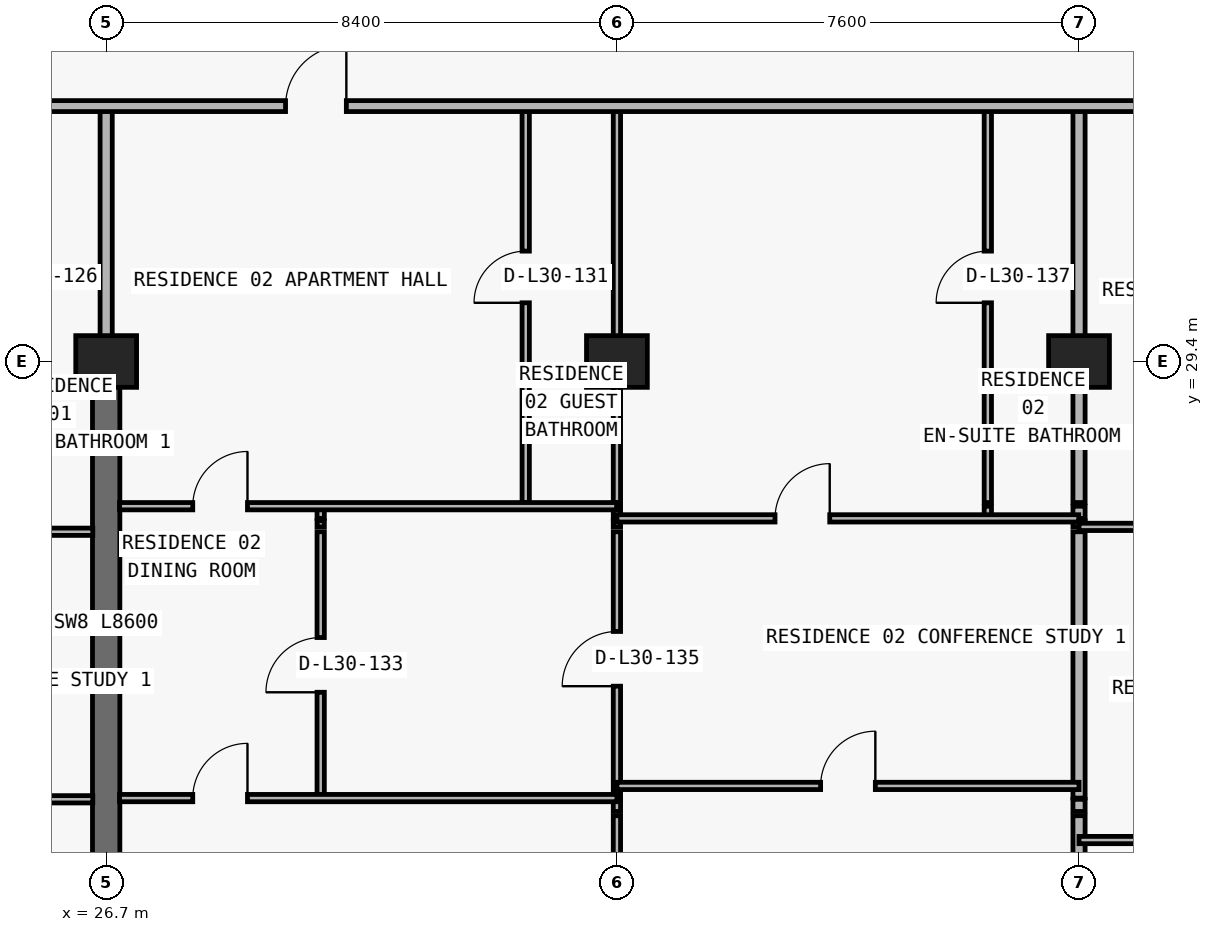
"""IFC4 building model, lengths in metres.
Left out: names, types, materials, properties, quantities, classifications, styles, units other than length and angle.
Written with IfcOpenShell. Run it as: python <this file> out.ifc"""

import sys

from ifc_helpers import new_model, si_unit, direction, frame, frame_2d, origin, origin_2d, place, context, subcontext, project, spatial, rectangle, extrude, element, fill, save


model = new_model("IFC4")
c1 = context("Model", 3, precision=1e-05, world=origin(), true_north=direction((0.0, 1.0)))
c2 = subcontext(c1, "Body", "Model", "MODEL_VIEW")
j1 = project(units=[si_unit("LENGTHUNIT", "METRE"), si_unit("PLANEANGLEUNIT", "RADIAN")], contexts=[c1])
p1 = place(None, origin())
s1 = spatial("IfcSite", under=j1, at=p1, CompositionType="ELEMENT")
p2 = place(p1, origin())
s2 = spatial("IfcBuilding", under=s1, at=p2, CompositionType="ELEMENT")
p3 = place(p2, frame((0.0, 0.0, 112.5)))
s3 = spatial("IfcBuildingStorey", under=s2, at=p3, CompositionType="ELEMENT", Elevation=112.5)
for number, where, z_axis, x_axis in (
    (1, (26.7, 29.4, 0.0), (0.0, 0.0, 1.0), (1.0, 0.0, 0.0)),
    (2, (35.1, 29.4, 0.0), (0.0, 0.0, 1.0), (1.0, 0.0, 0.0)),
    (3, (42.7, 29.4, 0.0), (0.0, 0.0, 1.0), (1.0, 0.0, 0.0)),
):
    element("IfcColumn", number, at=place(p3, frame(where, z_axis=z_axis, x_axis=x_axis)), inside=s3, PredefinedType="COLUMN", context=c2, shape_type="SweptSolid", body=[
        extrude(rectangle(XDim=1.0, YDim=0.85, at=origin_2d()), origin(), (0.0, 0.0, 1.0), 3.05),
    ])
p4 = place(p3, frame((26.7, 20.8, 0.0), z_axis=(0.0, 0.0, 1.0), x_axis=(0.0, 1.0, 0.0)))
e4 = element("IfcWall", 4, at=p4, inside=s3, PredefinedType="SHEAR", context=c2, shape_type="SweptSolid", body=[
    extrude(rectangle(XDim=8.6, YDim=0.45, at=frame_2d((4.3, 0.0))), origin(), (0.0, 0.0, 1.0), 3.05),
])
p5 = place(p3, frame((26.7, 29.405, 0.0), z_axis=(0.0, 0.0, 1.0), x_axis=(0.0, 1.0, 0.0)))
e5 = element("IfcWall", 5, at=p5, inside=s3, PredefinedType="PARTITIONING", context=c2, shape_type="SweptSolid", body=[
    extrude(rectangle(XDim=4.195, YDim=0.2, at=frame_2d((2.098, 0.0))), origin(), (0.0, 0.0, 1.0), 2.335),
])
p6 = place(p3, frame((30.228, 22.22, 0.0), z_axis=(0.0, 0.0, 1.0), x_axis=(0.0, 1.0, 0.0)))
e6 = element("IfcWall", 6, at=p6, inside=s3, PredefinedType="PARTITIONING", context=c2, shape_type="SweptSolid", body=[
    extrude(rectangle(XDim=4.38, YDim=0.12, at=frame_2d((2.19, 0.0))), origin(), (0.0, 0.0, 1.0), 3.05),
])
p7 = place(p6, frame((1.74, 0.0, 0.0)))
e7 = element("IfcOpeningElement", 7, at=p7, cuts=e6, PredefinedType="OPENING", context=c2, shape_type="SweptSolid", body=[
    extrude(rectangle(XDim=0.9, YDim=2.15, at=frame_2d((0.45, 1.075))), frame((0.0, 0.07, 0.0), z_axis=(0.0, -1.0, 0.0), x_axis=(1.0, 0.0, 0.0)), (0.0, 0.0, 1.0), 0.14),
])
p8 = place(p3, frame((30.228, 26.68, 0.0), z_axis=(0.0, 0.0, 1.0), x_axis=(0.0, 1.0, 0.0)))
e8 = element("IfcWall", 8, at=p8, inside=s3, PredefinedType="PARTITIONING", context=c2, shape_type="SweptSolid", body=[
    extrude(rectangle(XDim=0.1, YDim=0.12, at=frame_2d((0.05, 0.0))), origin(), (0.0, 0.0, 1.0), 3.05),
])
p9 = place(p3, frame((30.228, 26.82, 0.0), z_axis=(0.0, 0.0, 1.0), x_axis=(0.0, 1.0, 0.0)))
e9 = element("IfcWall", 9, at=p9, inside=s3, PredefinedType="PARTITIONING", context=c2, shape_type="SweptSolid", body=[
    extrude(rectangle(XDim=0.2, YDim=0.12, at=frame_2d((0.1, 0.0))), origin(), (0.0, 0.0, 1.0), 3.05),
])
p10 = place(p3, frame((33.6, 27.08, 0.0), z_axis=(0.0, 0.0, 1.0), x_axis=(0.0, 1.0, 0.0)))
e10 = element("IfcWall", 10, at=p10, inside=s3, PredefinedType="PARTITIONING", context=c2, shape_type="SweptSolid", body=[
    extrude(rectangle(XDim=6.52, YDim=0.12, at=frame_2d((3.26, 0.0))), origin(), (0.0, 0.0, 1.0), 3.05),
])
p11 = place(p10, frame((3.285, 0.0, 0.0)))
e11 = element("IfcOpeningElement", 11, at=p11, cuts=e10, PredefinedType="OPENING", context=c2, shape_type="SweptSolid", body=[
    extrude(rectangle(XDim=0.85, YDim=2.1, at=frame_2d((0.425, 1.05))), frame((0.0, 0.07, 0.0), z_axis=(0.0, -1.0, 0.0), x_axis=(1.0, 0.0, 0.0)), (0.0, 0.0, 1.0), 0.14),
])
p12 = place(p3, frame((35.1, 8.84, 0.0), z_axis=(0.0, 0.0, 1.0), x_axis=(0.0, 1.0, 0.0)))
e12 = element("IfcWall", 12, at=p12, inside=s3, PredefinedType="PARTITIONING", context=c2, shape_type="SweptSolid", body=[
    extrude(rectangle(XDim=13.09, YDim=0.12, at=frame_2d((6.545, 0.0))), origin(), (0.0, 0.0, 1.0), 2.174),
])
p13 = place(p3, frame((35.1, 22.0, 0.0), z_axis=(0.0, 0.0, 1.0), x_axis=(0.0, 1.0, 0.0)))
e13 = element("IfcWall", 13, at=p13, inside=s3, PredefinedType="PARTITIONING", context=c2, shape_type="SweptSolid", body=[
    extrude(rectangle(XDim=0.2, YDim=0.12, at=frame_2d((0.1, 0.0))), origin(), (0.0, 0.0, 1.0), 2.174),
])
p14 = place(p3, frame((35.1, 22.22, 0.0), z_axis=(0.0, 0.0, 1.0), x_axis=(0.0, 1.0, 0.0)))
e14 = element("IfcWall", 14, at=p14, inside=s3, PredefinedType="PARTITIONING", context=c2, shape_type="SweptSolid", body=[
    extrude(rectangle(XDim=4.38, YDim=0.12, at=frame_2d((2.19, 0.0))), origin(), (0.0, 0.0, 1.0), 2.174),
])
p15 = place(p14, frame((1.84, 0.0, 0.0)))
e15 = element("IfcOpeningElement", 15, at=p15, cuts=e14, PredefinedType="OPENING", context=c2, shape_type="SweptSolid", body=[
    extrude(rectangle(XDim=0.9, YDim=2.124, at=frame_2d((0.45, 1.062))), frame((0.0, 0.07, 0.0), z_axis=(0.0, -1.0, 0.0), x_axis=(1.0, 0.0, 0.0)), (0.0, 0.0, 1.0), 0.14),
])
p16 = place(p3, frame((35.1, 26.68, 0.0), z_axis=(0.0, 0.0, 1.0), x_axis=(0.0, 1.0, 0.0)))
e16 = element("IfcWall", 16, at=p16, inside=s3, PredefinedType="PARTITIONING", context=c2, shape_type="SweptSolid", body=[
    extrude(rectangle(XDim=0.1, YDim=0.12, at=frame_2d((0.05, 0.0))), origin(), (0.0, 0.0, 1.0), 2.174),
])
p17 = place(p3, frame((35.1, 26.82, 0.0), z_axis=(0.0, 0.0, 1.0), x_axis=(0.0, 1.0, 0.0)))
e17 = element("IfcWall", 17, at=p17, inside=s3, PredefinedType="PARTITIONING", context=c2, shape_type="SweptSolid", body=[
    extrude(rectangle(XDim=0.2, YDim=0.12, at=frame_2d((0.1, 0.0))), origin(), (0.0, 0.0, 1.0), 2.174),
])
p18 = place(p3, frame((35.1, 27.08, 0.0), z_axis=(0.0, 0.0, 1.0), x_axis=(0.0, 1.0, 0.0)))
e18 = element("IfcWall", 18, at=p18, inside=s3, PredefinedType="PARTITIONING", context=c2, shape_type="SweptSolid", body=[
    extrude(rectangle(XDim=6.52, YDim=0.12, at=frame_2d((3.26, 0.0))), origin(), (0.0, 0.0, 1.0), 2.174),
])
p19 = place(p3, frame((41.2, 26.82, 0.0), z_axis=(0.0, 0.0, 1.0), x_axis=(0.0, 1.0, 0.0)))
e19 = element("IfcWall", 19, at=p19, inside=s3, PredefinedType="PARTITIONING", context=c2, shape_type="SweptSolid", body=[
    extrude(rectangle(XDim=0.2, YDim=0.12, at=frame_2d((0.1, 0.0))), origin(), (0.0, 0.0, 1.0), 3.05),
])
p20 = place(p3, frame((41.2, 27.08, 0.0), z_axis=(0.0, 0.0, 1.0), x_axis=(0.0, 1.0, 0.0)))
e20 = element("IfcWall", 20, at=p20, inside=s3, PredefinedType="PARTITIONING", context=c2, shape_type="SweptSolid", body=[
    extrude(rectangle(XDim=6.52, YDim=0.12, at=frame_2d((3.26, 0.0))), origin(), (0.0, 0.0, 1.0), 3.05),
])
p21 = place(p20, frame((3.285, 0.0, 0.0)))
e21 = element("IfcOpeningElement", 21, at=p21, cuts=e20, PredefinedType="OPENING", context=c2, shape_type="SweptSolid", body=[
    extrude(rectangle(XDim=0.85, YDim=2.1, at=frame_2d((0.425, 1.05))), frame((0.0, 0.07, 0.0), z_axis=(0.0, -1.0, 0.0), x_axis=(1.0, 0.0, 0.0)), (0.0, 0.0, 1.0), 0.14),
])
p22 = place(p3, frame((42.7, 8.84, 0.0), z_axis=(0.0, 0.0, 1.0), x_axis=(0.0, 1.0, 0.0)))
e22 = element("IfcWall", 22, at=p22, inside=s3, PredefinedType="PARTITIONING", context=c2, shape_type="SweptSolid", body=[
    extrude(rectangle(XDim=13.09, YDim=0.2, at=frame_2d((6.545, 0.0))), origin(), (0.0, 0.0, 1.0), 2.174),
])
p23 = place(p3, frame((42.7, 22.0, 0.0), z_axis=(0.0, 0.0, 1.0), x_axis=(0.0, 1.0, 0.0)))
e23 = element("IfcWall", 23, at=p23, inside=s3, PredefinedType="PARTITIONING", context=c2, shape_type="SweptSolid", body=[
    extrude(rectangle(XDim=0.2, YDim=0.2, at=frame_2d((0.1, 0.0))), origin(), (0.0, 0.0, 1.0), 2.174),
])
p24 = place(p3, frame((42.7, 22.22, 0.0), z_axis=(0.0, 0.0, 1.0), x_axis=(0.0, 1.0, 0.0)))
e24 = element("IfcWall", 24, at=p24, inside=s3, PredefinedType="PARTITIONING", context=c2, shape_type="SweptSolid", body=[
    extrude(rectangle(XDim=4.38, YDim=0.2, at=frame_2d((2.19, 0.0))), origin(), (0.0, 0.0, 1.0), 2.174),
])
p25 = place(p3, frame((42.7, 26.68, 0.0), z_axis=(0.0, 0.0, 1.0), x_axis=(0.0, 1.0, 0.0)))
e25 = element("IfcWall", 25, at=p25, inside=s3, PredefinedType="PARTITIONING", context=c2, shape_type="SweptSolid", body=[
    extrude(rectangle(XDim=0.1, YDim=0.2, at=frame_2d((0.05, 0.0))), origin(), (0.0, 0.0, 1.0), 2.174),
])
p26 = place(p3, frame((42.7, 26.82, 0.0), z_axis=(0.0, 0.0, 1.0), x_axis=(0.0, 1.0, 0.0)))
e26 = element("IfcWall", 26, at=p26, inside=s3, PredefinedType="PARTITIONING", context=c2, shape_type="SweptSolid", body=[
    extrude(rectangle(XDim=0.2, YDim=0.2, at=frame_2d((0.1, 0.0))), origin(), (0.0, 0.0, 1.0), 2.174),
])
p27 = place(p3, frame((42.7, 27.08, 0.0), z_axis=(0.0, 0.0, 1.0), x_axis=(0.0, 1.0, 0.0)))
e27 = element("IfcWall", 27, at=p27, inside=s3, PredefinedType="PARTITIONING", context=c2, shape_type="SweptSolid", body=[
    extrude(rectangle(XDim=6.52, YDim=0.2, at=frame_2d((3.26, 0.0))), origin(), (0.0, 0.0, 1.0), 2.174),
])
p28 = place(p3, frame((42.7, 21.53, 0.0), z_axis=(0.0, 0.0, 1.0), x_axis=(1.0, 0.0, 0.0)))
e28 = element("IfcWall", 28, at=p28, inside=s3, PredefinedType="PARTITIONING", context=c2, shape_type="SweptSolid", body=[
    extrude(rectangle(XDim=8.18, YDim=0.12, at=frame_2d((4.09, 0.0))), origin(), (0.0, 0.0, 1.0), 3.05),
])
p29 = place(p28, frame((1.524, 0.0, 0.0)))
e29 = element("IfcOpeningElement", 29, at=p29, cuts=e28, PredefinedType="OPENING", context=c2, shape_type="SweptSolid", body=[
    extrude(rectangle(XDim=0.9, YDim=2.15, at=frame_2d((0.45, 1.075))), frame((0.0, 0.07, 0.0), z_axis=(0.0, -1.0, 0.0), x_axis=(1.0, 0.0, 0.0)), (0.0, 0.0, 1.0), 0.14),
])
p30 = place(p28, frame((5.783, 0.0, 0.0)))
e30 = element("IfcOpeningElement", 30, at=p30, cuts=e28, PredefinedType="OPENING", context=c2, shape_type="SweptSolid", body=[
    extrude(rectangle(XDim=0.9, YDim=2.15, at=frame_2d((0.45, 1.075))), frame((0.0, 0.07, 0.0), z_axis=(0.0, -1.0, 0.0), x_axis=(1.0, 0.0, 0.0)), (0.0, 0.0, 1.0), 0.14),
])
p31 = place(p3, frame((18.3, 22.2, 0.0), z_axis=(0.0, 0.0, 1.0), x_axis=(1.0, 0.0, 0.0)))
e31 = element("IfcWall", 31, at=p31, inside=s3, PredefinedType="PARTITIONING", context=c2, shape_type="SweptSolid", body=[
    extrude(rectangle(XDim=8.18, YDim=0.12, at=frame_2d((4.09, 0.0))), origin(), (0.0, 0.0, 1.0), 3.05),
])
p32 = place(p31, frame((3.64, 0.0, 0.0)))
e32 = element("IfcOpeningElement", 32, at=p32, cuts=e31, PredefinedType="OPENING", context=c2, shape_type="SweptSolid", body=[
    extrude(rectangle(XDim=0.9, YDim=2.15, at=frame_2d((0.45, 1.075))), frame((0.0, 0.07, 0.0), z_axis=(0.0, -1.0, 0.0), x_axis=(1.0, 0.0, 0.0)), (0.0, 0.0, 1.0), 0.14),
])
p33 = place(p3, frame((26.92, 22.22, 0.0), z_axis=(0.0, 0.0, 1.0), x_axis=(1.0, 0.0, 0.0)))
e33 = element("IfcWall", 33, at=p33, inside=s3, PredefinedType="PARTITIONING", context=c2, shape_type="SweptSolid", body=[
    extrude(rectangle(XDim=8.18, YDim=0.12, at=frame_2d((4.09, 0.0))), origin(), (0.0, 0.0, 1.0), 3.05),
])
p34 = place(p33, frame((1.204, 0.0, 0.0)))
e34 = element("IfcOpeningElement", 34, at=p34, cuts=e33, PredefinedType="OPENING", context=c2, shape_type="SweptSolid", body=[
    extrude(rectangle(XDim=0.9, YDim=2.15, at=frame_2d((0.45, 1.075))), frame((0.0, 0.07, 0.0), z_axis=(0.0, -1.0, 0.0), x_axis=(1.0, 0.0, 0.0)), (0.0, 0.0, 1.0), 0.14),
])
p35 = place(p3, frame((35.1, 22.42, 0.0), z_axis=(0.0, 0.0, 1.0), x_axis=(1.0, 0.0, 0.0)))
e35 = element("IfcWall", 35, at=p35, inside=s3, PredefinedType="PARTITIONING", context=c2, shape_type="SweptSolid", body=[
    extrude(rectangle(XDim=7.6, YDim=0.12, at=frame_2d((3.8, 0.0))), origin(), (0.0, 0.0, 1.0), 3.05),
])
p36 = place(p35, frame((3.35, 0.0, 0.0)))
e36 = element("IfcOpeningElement", 36, at=p36, cuts=e35, PredefinedType="OPENING", context=c2, shape_type="SweptSolid", body=[
    extrude(rectangle(XDim=0.9, YDim=2.15, at=frame_2d((0.45, 1.075))), frame((0.0, 0.07, 0.0), z_axis=(0.0, -1.0, 0.0), x_axis=(1.0, 0.0, 0.0)), (0.0, 0.0, 1.0), 0.14),
])
p37 = place(p3, frame((18.3, 26.6, 0.0), z_axis=(0.0, 0.0, 1.0), x_axis=(1.0, 0.0, 0.0)))
e37 = element("IfcWall", 37, at=p37, inside=s3, PredefinedType="PARTITIONING", context=c2, shape_type="SweptSolid", body=[
    extrude(rectangle(XDim=8.18, YDim=0.12, at=frame_2d((4.09, 0.0))), origin(), (0.0, 0.0, 1.0), 3.05),
])
p38 = place(p37, frame((3.0, 0.0, 0.0)))
e38 = element("IfcOpeningElement", 38, at=p38, cuts=e37, PredefinedType="OPENING", context=c2, shape_type="SweptSolid", body=[
    extrude(rectangle(XDim=0.9, YDim=2.15, at=frame_2d((0.45, 1.075))), frame((0.0, 0.07, 0.0), z_axis=(0.0, -1.0, 0.0), x_axis=(1.0, 0.0, 0.0)), (0.0, 0.0, 1.0), 0.14),
])
p39 = place(p3, frame((42.7, 26.68, 0.0), z_axis=(0.0, 0.0, 1.0), x_axis=(1.0, 0.0, 0.0)))
e39 = element("IfcWall", 39, at=p39, inside=s3, PredefinedType="PARTITIONING", context=c2, shape_type="SweptSolid", body=[
    extrude(rectangle(XDim=8.18, YDim=0.12, at=frame_2d((4.09, 0.0))), origin(), (0.0, 0.0, 1.0), 3.05),
])
p40 = place(p39, frame((1.693, 0.0, 0.0)))
e40 = element("IfcOpeningElement", 40, at=p40, cuts=e39, PredefinedType="OPENING", context=c2, shape_type="SweptSolid", body=[
    extrude(rectangle(XDim=0.9, YDim=2.15, at=frame_2d((0.45, 1.075))), frame((0.0, 0.07, 0.0), z_axis=(0.0, -1.0, 0.0), x_axis=(1.0, 0.0, 0.0)), (0.0, 0.0, 1.0), 0.14),
])
p41 = place(p3, frame((35.1, 26.82, 0.0), z_axis=(0.0, 0.0, 1.0), x_axis=(1.0, 0.0, 0.0)))
e41 = element("IfcWall", 41, at=p41, inside=s3, PredefinedType="PARTITIONING", context=c2, shape_type="SweptSolid", body=[
    extrude(rectangle(XDim=7.595, YDim=0.12, at=frame_2d((3.797, 0.0))), origin(), (0.0, 0.0, 1.0), 3.05),
])
p42 = place(p41, frame((2.6, 0.0, 0.0)))
e42 = element("IfcOpeningElement", 42, at=p42, cuts=e41, PredefinedType="OPENING", context=c2, shape_type="SweptSolid", body=[
    extrude(rectangle(XDim=0.9, YDim=2.15, at=frame_2d((0.45, 1.075))), frame((0.0, 0.07, 0.0), z_axis=(0.0, -1.0, 0.0), x_axis=(1.0, 0.0, 0.0)), (0.0, 0.0, 1.0), 0.14),
])
p43 = place(p3, frame((26.92, 27.02, 0.0), z_axis=(0.0, 0.0, 1.0), x_axis=(1.0, 0.0, 0.0)))
e43 = element("IfcWall", 43, at=p43, inside=s3, PredefinedType="PARTITIONING", context=c2, shape_type="SweptSolid", body=[
    extrude(rectangle(XDim=8.175, YDim=0.12, at=frame_2d((4.087, 0.0))), origin(), (0.0, 0.0, 1.0), 3.05),
])
p44 = place(p43, frame((1.204, 0.0, 0.0)))
e44 = element("IfcOpeningElement", 44, at=p44, cuts=e43, PredefinedType="OPENING", context=c2, shape_type="SweptSolid", body=[
    extrude(rectangle(XDim=0.9, YDim=2.15, at=frame_2d((0.45, 1.075))), frame((0.0, 0.07, 0.0), z_axis=(0.0, -1.0, 0.0), x_axis=(1.0, 0.0, 0.0)), (0.0, 0.0, 1.0), 0.14),
])
p45 = place(p3, frame((18.3, 33.6, 0.0), z_axis=(0.0, 0.0, 1.0), x_axis=(1.0, 0.0, 0.0)))
e45 = element("IfcWall", 45, at=p45, inside=s3, PredefinedType="PARTITIONING", context=c2, shape_type="SweptSolid", body=[
    extrude(rectangle(XDim=41.2, YDim=0.18, at=frame_2d((20.6, 0.0))), origin(), (0.0, 0.0, 1.0), 3.05),
])
p46 = place(p45, frame((11.35, 0.0, 0.0)))
e46 = element("IfcOpeningElement", 46, at=p46, cuts=e45, PredefinedType="OPENING", context=c2, shape_type="SweptSolid", body=[
    extrude(rectangle(XDim=1.0, YDim=2.2, at=frame_2d((0.5, 1.1))), frame((0.0, 0.1, 0.0), z_axis=(0.0, -1.0, 0.0), x_axis=(1.0, 0.0, 0.0)), (0.0, 0.0, 1.0), 0.2),
])
p47 = place(p45, frame((27.275, 0.0, 0.0)))
e47 = element("IfcOpeningElement", 47, at=p47, cuts=e45, PredefinedType="OPENING", context=c2, shape_type="SweptSolid", body=[
    extrude(rectangle(XDim=1.0, YDim=2.2, at=frame_2d((0.5, 1.1))), frame((0.0, 0.1, 0.0), z_axis=(0.0, -1.0, 0.0), x_axis=(1.0, 0.0, 0.0)), (0.0, 0.0, 1.0), 0.2),
])
p48 = place(p45, frame((35.675, 0.0, 0.0)))
e48 = element("IfcOpeningElement", 48, at=p48, cuts=e45, PredefinedType="OPENING", context=c2, shape_type="SweptSolid", body=[
    extrude(rectangle(XDim=1.0, YDim=2.2, at=frame_2d((0.5, 1.1))), frame((0.0, 0.1, 0.0), z_axis=(0.0, -1.0, 0.0), x_axis=(1.0, 0.0, 0.0)), (0.0, 0.0, 1.0), 0.2),
])
p49 = place(p46, origin())
e49 = element("IfcDoor", 49, at=p49, inside=s3, OperationType="SINGLE_SWING_RIGHT", PredefinedType="DOOR", context=c2, shape_type="SweptSolid", body=[
    extrude(rectangle(XDim=1.0, YDim=2.2, at=frame_2d((0.5, 1.1))), frame((0.0, 0.025, 0.0), z_axis=(0.0, -1.0, 0.0), x_axis=(1.0, 0.0, 0.0)), (0.0, 0.0, 1.0), 0.05),
])
fill(e46, e49)
p50 = place(p11, origin())
e50 = element("IfcDoor", 50, at=p50, inside=s3, OperationType="SINGLE_SWING_LEFT", PredefinedType="DOOR", context=c2, shape_type="SweptSolid", body=[
    extrude(rectangle(XDim=0.85, YDim=2.1, at=frame_2d((0.425, 1.05))), frame((0.0, 0.025, 0.0), z_axis=(0.0, -1.0, 0.0), x_axis=(1.0, 0.0, 0.0)), (0.0, 0.0, 1.0), 0.05),
])
fill(e11, e50)
p51 = place(p44, origin())
e51 = element("IfcDoor", 51, at=p51, inside=s3, OperationType="SINGLE_SWING_RIGHT", PredefinedType="DOOR", context=c2, shape_type="SweptSolid", body=[
    extrude(rectangle(XDim=0.9, YDim=2.15, at=frame_2d((0.45, 1.075))), frame((0.0, 0.025, 0.0), z_axis=(0.0, -1.0, 0.0), x_axis=(1.0, 0.0, 0.0)), (0.0, 0.0, 1.0), 0.05),
])
fill(e44, e51)
p52 = place(p7, origin())
e52 = element("IfcDoor", 52, at=p52, inside=s3, OperationType="SINGLE_SWING_LEFT", PredefinedType="DOOR", context=c2, shape_type="SweptSolid", body=[
    extrude(rectangle(XDim=0.9, YDim=2.15, at=frame_2d((0.45, 1.075))), frame((0.0, 0.025, 0.0), z_axis=(0.0, -1.0, 0.0), x_axis=(1.0, 0.0, 0.0)), (0.0, 0.0, 1.0), 0.05),
])
fill(e7, e52)
p53 = place(p34, origin())
e53 = element("IfcDoor", 53, at=p53, inside=s3, OperationType="SINGLE_SWING_RIGHT", PredefinedType="DOOR", context=c2, shape_type="SweptSolid", body=[
    extrude(rectangle(XDim=0.9, YDim=2.15, at=frame_2d((0.45, 1.075))), frame((0.0, 0.025, 0.0), z_axis=(0.0, -1.0, 0.0), x_axis=(1.0, 0.0, 0.0)), (0.0, 0.0, 1.0), 0.05),
])
fill(e34, e53)
p54 = place(p15, origin())
e54 = element("IfcDoor", 54, at=p54, inside=s3, OperationType="SINGLE_SWING_LEFT", PredefinedType="DOOR", context=c2, shape_type="SweptSolid", body=[
    extrude(rectangle(XDim=0.9, YDim=2.124, at=frame_2d((0.45, 1.062))), frame((0.0, 0.025, 0.0), z_axis=(0.0, -1.0, 0.0), x_axis=(1.0, 0.0, 0.0)), (0.0, 0.0, 1.0), 0.05),
])
fill(e15, e54)
p55 = place(p42, origin())
e55 = element("IfcDoor", 55, at=p55, inside=s3, OperationType="SINGLE_SWING_RIGHT", PredefinedType="DOOR", context=c2, shape_type="SweptSolid", body=[
    extrude(rectangle(XDim=0.9, YDim=2.15, at=frame_2d((0.45, 1.075))), frame((0.0, 0.025, 0.0), z_axis=(0.0, -1.0, 0.0), x_axis=(1.0, 0.0, 0.0)), (0.0, 0.0, 1.0), 0.05),
])
fill(e42, e55)
p56 = place(p21, origin())
e56 = element("IfcDoor", 56, at=p56, inside=s3, OperationType="SINGLE_SWING_LEFT", PredefinedType="DOOR", context=c2, shape_type="SweptSolid", body=[
    extrude(rectangle(XDim=0.85, YDim=2.1, at=frame_2d((0.425, 1.05))), frame((0.0, 0.025, 0.0), z_axis=(0.0, -1.0, 0.0), x_axis=(1.0, 0.0, 0.0)), (0.0, 0.0, 1.0), 0.05),
])
fill(e21, e56)
p57 = place(p36, origin())
e57 = element("IfcDoor", 57, at=p57, inside=s3, OperationType="SINGLE_SWING_RIGHT", PredefinedType="DOOR", context=c2, shape_type="SweptSolid", body=[
    extrude(rectangle(XDim=0.9, YDim=2.15, at=frame_2d((0.45, 1.075))), frame((0.0, 0.025, 0.0), z_axis=(0.0, -1.0, 0.0), x_axis=(1.0, 0.0, 0.0)), (0.0, 0.0, 1.0), 0.05),
])
fill(e36, e57)
save(model, sys.argv[1])
